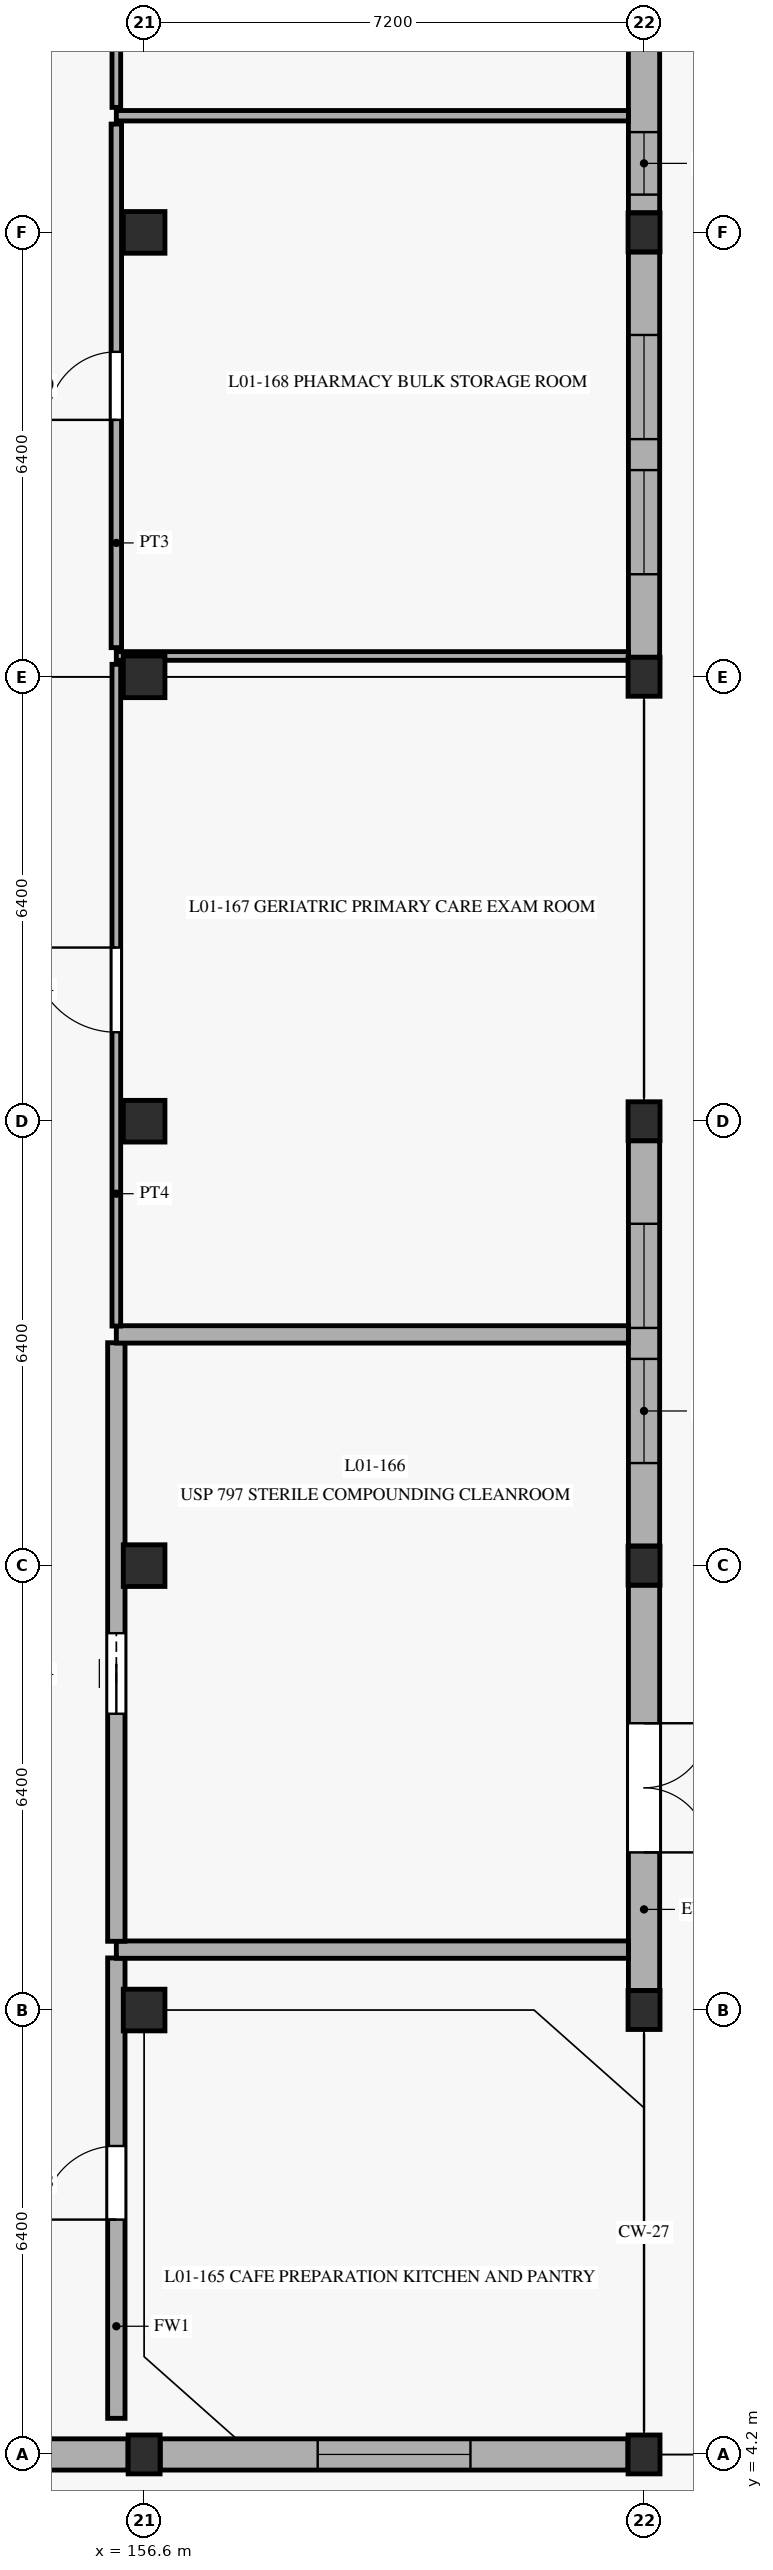
"""IFC4 building model, lengths in metres.
Left out: names, types, materials, properties, quantities, classifications, styles, units other than length and angle.
Written with IfcOpenShell. Run it as: python <this file> out.ifc"""

import sys

from ifc_helpers import new_model, si_unit, direction, frame, frame_2d, origin, origin_with_axes, origin_2d, place, context, subcontext, project, spatial, rectangle, extrude, element, fill, save


model = new_model("IFC4")
c1 = context("Model", 3, precision=1e-05, world=origin(), true_north=direction((0.0, 1.0)))
c2 = subcontext(c1, "Body", "Model", "MODEL_VIEW")
j1 = project(units=[si_unit("LENGTHUNIT", "METRE"), si_unit("PLANEANGLEUNIT", "RADIAN")], contexts=[c1])
p1 = place(None, origin())
s1 = spatial("IfcSite", under=j1, at=p1, CompositionType="ELEMENT")
p2 = place(p1, origin())
s2 = spatial("IfcBuilding", under=s1, at=p2, CompositionType="ELEMENT")
p3 = place(p2, origin())
s3 = spatial("IfcBuildingStorey", under=s2, at=p3, CompositionType="ELEMENT", Elevation=0.0)
p4 = place(p3, frame((156.6, 4.2, 0.0), z_axis=(0.0, 0.0, 1.0), x_axis=(1.0, 0.0, 0.0)))
e1 = element("IfcColumn", 1, at=p4, inside=s3, PredefinedType="COLUMN", context=c2, shape_type="SweptSolid", body=[
    extrude(rectangle(XDim=0.46, YDim=0.56, at=origin_2d()), origin(), (0.0, 0.0, 1.0), 4.8),
])
for number, where, z_axis, x_axis in (
    (2, (156.6, 10.6, 0.0), (0.0, 0.0, 1.0), (1.0, 0.0, 0.0)),
    (3, (156.6, 17.0, 0.0), (0.0, 0.0, 1.0), (1.0, 0.0, 0.0)),
    (4, (156.6, 23.4, 0.0), (0.0, 0.0, 1.0), (1.0, 0.0, 0.0)),
    (5, (156.6, 29.8, 0.0), (0.0, 0.0, 1.0), (1.0, 0.0, 0.0)),
    (6, (156.6, 36.2, 0.0), (0.0, 0.0, 1.0), (1.0, 0.0, 0.0)),
):
    element("IfcColumn", number, at=place(p3, frame(where, z_axis=z_axis, x_axis=x_axis)), inside=s3, PredefinedType="COLUMN", context=c2, shape_type="SweptSolid", body=[
        extrude(rectangle(XDim=0.6, YDim=0.6, at=origin_2d()), origin(), (0.0, 0.0, 1.0), 4.8),
    ])
for number, where, z_axis, x_axis in (
    (7, (163.8, 4.2, 0.0), (0.0, 0.0, 1.0), (1.0, 0.0, 0.0)),
    (8, (163.8, 10.6, 0.0), (0.0, 0.0, 1.0), (1.0, 0.0, 0.0)),
    (9, (163.8, 17.0, 0.0), (0.0, 0.0, 1.0), (1.0, 0.0, 0.0)),
    (10, (163.8, 23.4, 0.0), (0.0, 0.0, 1.0), (1.0, 0.0, 0.0)),
    (11, (163.8, 29.8, 0.0), (0.0, 0.0, 1.0), (1.0, 0.0, 0.0)),
    (12, (163.8, 36.2, 0.0), (0.0, 0.0, 1.0), (1.0, 0.0, 0.0)),
):
    element("IfcColumn", number, at=place(p3, frame(where, z_axis=z_axis, x_axis=x_axis)), inside=s3, PredefinedType="COLUMN", context=c2, shape_type="SweptSolid", body=[
        extrude(rectangle(XDim=0.46, YDim=0.56, at=origin_2d()), origin(), (0.0, 0.0, 1.0), 4.8),
    ])
p5 = place(p3, frame((163.8, 10.882, 0.0), z_axis=(0.0, 0.0, 1.0), x_axis=(0.0, 1.0, 0.0)))
e13 = element("IfcWall", 13, at=p5, inside=s3, PredefinedType="SOLIDWALL", context=c2, shape_type="SweptSolid", body=[
    extrude(rectangle(XDim=5.836, YDim=0.45, at=frame_2d((2.918, 0.0))), origin(), (0.0, 0.0, 1.0), 3.95),
])
p6 = place(p5, frame((1.988, 0.0, 0.0)))
e14 = element("IfcOpeningElement", 14, at=p6, cuts=e13, PredefinedType="OPENING", context=c2, shape_type="SweptSolid", body=[
    extrude(rectangle(XDim=1.86, YDim=2.5, at=frame_2d((0.93, 1.25))), frame((0.0, 0.235, 0.0), z_axis=(0.0, -1.0, 0.0), x_axis=(1.0, 0.0, 0.0)), (0.0, 0.0, 1.0), 0.47),
])
p7 = place(p3, frame((163.8, 17.282, 0.0), z_axis=(0.0, 0.0, 1.0), x_axis=(0.0, 1.0, 0.0)))
e15 = element("IfcWall", 15, at=p7, inside=s3, PredefinedType="SOLIDWALL", context=c2, shape_type="SweptSolid", body=[
    extrude(rectangle(XDim=5.836, YDim=0.45, at=frame_2d((2.918, 0.0))), origin(), (0.0, 0.0, 1.0), 3.95),
])
p8 = place(p7, frame((1.195, 0.0, 0.65)))
e16 = element("IfcOpeningElement", 16, at=p8, cuts=e15, PredefinedType="OPENING", context=c2, shape_type="SweptSolid", body=[
    extrude(rectangle(XDim=1.5, YDim=2.2, at=frame_2d((0.75, 1.1))), frame((0.0, 0.235, 0.0), z_axis=(0.0, -1.0, 0.0), x_axis=(1.0, 0.0, 0.0)), (0.0, 0.0, 1.0), 0.47),
])
p9 = place(p7, frame((3.141, 0.0, 0.65)))
e17 = element("IfcOpeningElement", 17, at=p9, cuts=e15, PredefinedType="OPENING", context=c2, shape_type="SweptSolid", body=[
    extrude(rectangle(XDim=1.5, YDim=2.2, at=frame_2d((0.75, 1.1))), frame((0.0, 0.235, 0.0), z_axis=(0.0, -1.0, 0.0), x_axis=(1.0, 0.0, 0.0)), (0.0, 0.0, 1.0), 0.47),
])
p10 = place(p3, frame((163.8, 30.082, 0.0), z_axis=(0.0, 0.0, 1.0), x_axis=(0.0, 1.0, 0.0)))
e18 = element("IfcWall", 18, at=p10, inside=s3, PredefinedType="SOLIDWALL", context=c2, shape_type="SweptSolid", body=[
    extrude(rectangle(XDim=5.836, YDim=0.45, at=frame_2d((2.918, 0.0))), origin(), (0.0, 0.0, 1.0), 3.95),
])
p11 = place(p10, frame((1.195, 0.0, 0.65)))
e19 = element("IfcOpeningElement", 19, at=p11, cuts=e18, PredefinedType="OPENING", context=c2, shape_type="SweptSolid", body=[
    extrude(rectangle(XDim=1.5, YDim=2.2, at=frame_2d((0.75, 1.1))), frame((0.0, 0.235, 0.0), z_axis=(0.0, -1.0, 0.0), x_axis=(1.0, 0.0, 0.0)), (0.0, 0.0, 1.0), 0.47),
])
p12 = place(p10, frame((3.141, 0.0, 0.65)))
e20 = element("IfcOpeningElement", 20, at=p12, cuts=e18, PredefinedType="OPENING", context=c2, shape_type="SweptSolid", body=[
    extrude(rectangle(XDim=1.5, YDim=2.2, at=frame_2d((0.75, 1.1))), frame((0.0, 0.235, 0.0), z_axis=(0.0, -1.0, 0.0), x_axis=(1.0, 0.0, 0.0)), (0.0, 0.0, 1.0), 0.47),
])
p13 = place(p3, frame((163.8, 36.482, 0.0), z_axis=(0.0, 0.0, 1.0), x_axis=(0.0, 1.0, 0.0)))
e21 = element("IfcWall", 21, at=p13, inside=s3, PredefinedType="SOLIDWALL", context=c2, shape_type="SweptSolid", body=[
    extrude(rectangle(XDim=5.836, YDim=0.45, at=frame_2d((2.918, 0.0))), origin(), (0.0, 0.0, 1.0), 3.95),
])
p14 = place(p13, frame((0.262, 0.0, 0.65)))
e22 = element("IfcOpeningElement", 22, at=p14, cuts=e21, PredefinedType="OPENING", context=c2, shape_type="SweptSolid", body=[
    extrude(rectangle(XDim=0.9, YDim=2.2, at=frame_2d((0.45, 1.1))), frame((0.0, 0.235, 0.0), z_axis=(0.0, -1.0, 0.0), x_axis=(1.0, 0.0, 0.0)), (0.0, 0.0, 1.0), 0.47),
])
p15 = place(p13, frame((2.854, 0.0, 0.65)))
e23 = element("IfcOpeningElement", 23, at=p15, cuts=e21, PredefinedType="OPENING", context=c2, shape_type="SweptSolid", body=[
    extrude(rectangle(XDim=1.5, YDim=2.2, at=frame_2d((0.75, 1.1))), frame((0.0, 0.235, 0.0), z_axis=(0.0, -1.0, 0.0), x_axis=(1.0, 0.0, 0.0)), (0.0, 0.0, 1.0), 0.47),
])
p16 = place(p3, frame((149.032, 4.2, 0.0), z_axis=(0.0, 0.0, 1.0), x_axis=(1.0, 0.0, 0.0)))
e24 = element("IfcWall", 24, at=p16, inside=s3, PredefinedType="SOLIDWALL", context=c2, shape_type="SweptSolid", body=[
    extrude(rectangle(XDim=7.336, YDim=0.45, at=frame_2d((3.668, 0.0))), origin(), (0.0, 0.0, 1.0), 4.0),
])
p17 = place(p16, frame((2.568, 0.0, 0.9)))
e25 = element("IfcOpeningElement", 25, at=p17, cuts=e24, PredefinedType="OPENING", context=c2, shape_type="SweptSolid", body=[
    extrude(rectangle(XDim=2.2, YDim=1.1, at=frame_2d((1.1, 0.55))), frame((0.0, 0.235, 0.0), z_axis=(0.0, -1.0, 0.0), x_axis=(1.0, 0.0, 0.0)), (0.0, 0.0, 1.0), 0.47),
])
p18 = place(p3, frame((156.832, 4.2, 0.0), z_axis=(0.0, 0.0, 1.0), x_axis=(1.0, 0.0, 0.0)))
e26 = element("IfcWall", 26, at=p18, inside=s3, PredefinedType="SOLIDWALL", context=c2, shape_type="SweptSolid", body=[
    extrude(rectangle(XDim=6.736, YDim=0.45, at=frame_2d((3.368, 0.0))), origin(), (0.0, 0.0, 1.0), 4.0),
])
p19 = place(p18, frame((2.268, 0.0, 0.9)))
e27 = element("IfcOpeningElement", 27, at=p19, cuts=e26, PredefinedType="OPENING", context=c2, shape_type="SweptSolid", body=[
    extrude(rectangle(XDim=2.2, YDim=1.1, at=frame_2d((1.1, 0.55))), frame((0.0, 0.235, 0.0), z_axis=(0.0, -1.0, 0.0), x_axis=(1.0, 0.0, 0.0)), (0.0, 0.0, 1.0), 0.47),
])
p20 = place(p3, frame((156.2, 4.72, 0.0), z_axis=(0.0, 0.0, 1.0), x_axis=(0.0, 1.0, 0.0)))
e28 = element("IfcWall", 28, at=p20, inside=s3, PredefinedType="SOLIDWALL", context=c2, shape_type="SweptSolid", body=[
    extrude(rectangle(XDim=6.63, YDim=0.25, at=frame_2d((3.315, 0.0))), origin(), (0.0, 0.0, 1.0), 4.095),
])
p21 = place(p20, frame((2.862, 0.0, 0.0)))
e29 = element("IfcOpeningElement", 29, at=p21, cuts=e28, PredefinedType="OPENING", context=c2, shape_type="SweptSolid", body=[
    extrude(rectangle(XDim=1.06, YDim=2.2, at=frame_2d((0.53, 1.1))), frame((0.0, 0.135, 0.0), z_axis=(0.0, -1.0, 0.0), x_axis=(1.0, 0.0, 0.0)), (0.0, 0.0, 1.0), 0.27),
])
p22 = place(p3, frame((156.2, 11.47, 0.0), z_axis=(0.0, 0.0, 1.0), x_axis=(1.0, 0.0, 0.0)))
e30 = element("IfcWall", 30, at=p22, inside=s3, PredefinedType="SOLIDWALL", context=c2, shape_type="SweptSolid", body=[
    extrude(rectangle(XDim=7.375, YDim=0.25, at=frame_2d((3.688, 0.0))), origin(), (0.0, 0.0, 1.0), 3.945),
])
p23 = place(p3, frame((156.2, 11.59, 0.0), z_axis=(0.0, 0.0, 1.0), x_axis=(0.0, 1.0, 0.0)))
e31 = element("IfcWall", 31, at=p23, inside=s3, PredefinedType="SOLIDWALL", context=c2, shape_type="SweptSolid", body=[
    extrude(rectangle(XDim=8.62, YDim=0.25, at=frame_2d((4.31, 0.0))), origin(), (0.0, 0.0, 1.0), 4.095),
])
p24 = place(p23, frame((3.277, 0.0, 0.0)))
e32 = element("IfcOpeningElement", 32, at=p24, cuts=e31, PredefinedType="OPENING", context=c2, shape_type="SweptSolid", body=[
    extrude(rectangle(XDim=1.16, YDim=2.2, at=frame_2d((0.58, 1.1))), frame((0.0, 0.135, 0.0), z_axis=(0.0, -1.0, 0.0), x_axis=(1.0, 0.0, 0.0)), (0.0, 0.0, 1.0), 0.27),
])
p25 = place(p3, frame((156.2, 20.33, 0.0), z_axis=(0.0, 0.0, 1.0), x_axis=(1.0, 0.0, 0.0)))
e33 = element("IfcWall", 33, at=p25, inside=s3, PredefinedType="SOLIDWALL", context=c2, shape_type="SweptSolid", body=[
    extrude(rectangle(XDim=7.375, YDim=0.25, at=frame_2d((3.688, 0.0))), origin(), (0.0, 0.0, 1.0), 3.945),
])
p26 = place(p3, frame((156.2, 20.45, 0.0), z_axis=(0.0, 0.0, 1.0), x_axis=(0.0, 1.0, 0.0)))
e34 = element("IfcWall", 34, at=p26, inside=s3, PredefinedType="PARTITIONING", context=c2, shape_type="SweptSolid", body=[
    extrude(rectangle(XDim=9.53, YDim=0.125, at=frame_2d((4.765, 0.0))), origin(), (0.0, 0.0, 1.0), 3.845),
])
p27 = place(p26, frame((4.231, 0.0, 0.0)))
e35 = element("IfcOpeningElement", 35, at=p27, cuts=e34, PredefinedType="OPENING", context=c2, shape_type="SweptSolid", body=[
    extrude(rectangle(XDim=1.22, YDim=2.2, at=frame_2d((0.61, 1.1))), frame((0.0, 0.073, 0.0), z_axis=(0.0, -1.0, 0.0), x_axis=(1.0, 0.0, 0.0)), (0.0, 0.0, 1.0), 0.145),
])
p28 = place(p3, frame((156.2, 30.1, 0.0), z_axis=(0.0, 0.0, 1.0), x_axis=(1.0, 0.0, 0.0)))
e36 = element("IfcWall", 36, at=p28, inside=s3, PredefinedType="PARTITIONING", context=c2, shape_type="SweptSolid", body=[
    extrude(rectangle(XDim=7.375, YDim=0.125, at=frame_2d((3.688, 0.0))), origin(), (0.0, 0.0, 1.0), 3.945),
])
p29 = place(p3, frame((156.2, 30.22, 0.0), z_axis=(0.0, 0.0, 1.0), x_axis=(0.0, 1.0, 0.0)))
e37 = element("IfcWall", 37, at=p29, inside=s3, PredefinedType="PARTITIONING", context=c2, shape_type="SweptSolid", body=[
    extrude(rectangle(XDim=7.54, YDim=0.15, at=frame_2d((3.77, 0.0))), origin(), (0.0, 0.0, 1.0), 4.495),
])
p30 = place(p29, frame((3.28, 0.0, 0.0)))
e38 = element("IfcOpeningElement", 38, at=p30, cuts=e37, PredefinedType="OPENING", context=c2, shape_type="SweptSolid", body=[
    extrude(rectangle(XDim=0.98, YDim=2.12, at=frame_2d((0.49, 1.06))), frame((0.0, 0.085, 0.0), z_axis=(0.0, -1.0, 0.0), x_axis=(1.0, 0.0, 0.0)), (0.0, 0.0, 1.0), 0.17),
])
p31 = place(p3, frame((156.2, 37.88, 0.0), z_axis=(0.0, 0.0, 1.0), x_axis=(1.0, 0.0, 0.0)))
e39 = element("IfcWall", 39, at=p31, inside=s3, PredefinedType="PARTITIONING", context=c2, shape_type="SweptSolid", body=[
    extrude(rectangle(XDim=7.375, YDim=0.15, at=frame_2d((3.688, 0.0))), origin(), (0.0, 0.0, 1.0), 3.945),
])
p32 = place(p3, frame((156.2, 38.0, 0.0), z_axis=(0.0, 0.0, 1.0), x_axis=(0.0, 1.0, 0.0)))
e40 = element("IfcWall", 40, at=p32, inside=s3, PredefinedType="PARTITIONING", context=c2, shape_type="SweptSolid", body=[
    extrude(rectangle(XDim=9.03, YDim=0.125, at=frame_2d((4.515, 0.0))), origin(), (0.0, 0.0, 1.0), 4.495),
])
p33 = place(p32, frame((2.847, 0.0, 0.0)))
e41 = element("IfcOpeningElement", 41, at=p33, cuts=e40, PredefinedType="OPENING", context=c2, shape_type="SweptSolid", body=[
    extrude(rectangle(XDim=0.9, YDim=2.12, at=frame_2d((0.45, 1.06))), frame((0.0, 0.073, 0.0), z_axis=(0.0, -1.0, 0.0), x_axis=(1.0, 0.0, 0.0)), (0.0, 0.0, 1.0), 0.145),
])
p34 = place(p6, frame((1.86, 0.0, 0.0), z_axis=(0.0, 0.0, 1.0), x_axis=(-1.0, 0.0, 0.0)))
e42 = element("IfcDoor", 42, at=p34, inside=s3, OperationType="DOUBLE_DOOR_SINGLE_SWING", PredefinedType="DOOR", context=c2, shape_type="SweptSolid", body=[
    extrude(rectangle(XDim=1.86, YDim=2.5, at=frame_2d((0.93, 1.25))), frame((0.0, 0.025, 0.0), z_axis=(0.0, -1.0, 0.0), x_axis=(1.0, 0.0, 0.0)), (0.0, 0.0, 1.0), 0.05),
])
fill(e14, e42)
p35 = place(p8, origin_with_axes())
e43 = element("IfcWindow", 43, at=p35, inside=s3, PartitioningType="SINGLE_PANEL", PredefinedType="WINDOW", context=c2, shape_type="SweptSolid", body=[
    extrude(rectangle(XDim=1.5, YDim=2.2, at=frame_2d((0.75, 1.1))), frame((0.0, 0.03, 0.0), z_axis=(0.0, -1.0, 0.0), x_axis=(1.0, 0.0, 0.0)), (0.0, 0.0, 1.0), 0.06),
])
fill(e16, e43)
p36 = place(p9, origin_with_axes())
e44 = element("IfcWindow", 44, at=p36, inside=s3, PartitioningType="SINGLE_PANEL", PredefinedType="WINDOW", context=c2, shape_type="SweptSolid", body=[
    extrude(rectangle(XDim=1.5, YDim=2.2, at=frame_2d((0.75, 1.1))), frame((0.0, 0.03, 0.0), z_axis=(0.0, -1.0, 0.0), x_axis=(1.0, 0.0, 0.0)), (0.0, 0.0, 1.0), 0.06),
])
fill(e17, e44)
p37 = place(p11, origin_with_axes())
e45 = element("IfcWindow", 45, at=p37, inside=s3, PartitioningType="SINGLE_PANEL", PredefinedType="WINDOW", context=c2, shape_type="SweptSolid", body=[
    extrude(rectangle(XDim=1.5, YDim=2.2, at=frame_2d((0.75, 1.1))), frame((0.0, 0.03, 0.0), z_axis=(0.0, -1.0, 0.0), x_axis=(1.0, 0.0, 0.0)), (0.0, 0.0, 1.0), 0.06),
])
fill(e19, e45)
p38 = place(p12, origin_with_axes())
e46 = element("IfcWindow", 46, at=p38, inside=s3, PartitioningType="SINGLE_PANEL", PredefinedType="WINDOW", context=c2, shape_type="SweptSolid", body=[
    extrude(rectangle(XDim=1.5, YDim=2.2, at=frame_2d((0.75, 1.1))), frame((0.0, 0.03, 0.0), z_axis=(0.0, -1.0, 0.0), x_axis=(1.0, 0.0, 0.0)), (0.0, 0.0, 1.0), 0.06),
])
fill(e20, e46)
p39 = place(p14, origin_with_axes())
e47 = element("IfcWindow", 47, at=p39, inside=s3, PartitioningType="SINGLE_PANEL", PredefinedType="WINDOW", context=c2, shape_type="SweptSolid", body=[
    extrude(rectangle(XDim=0.9, YDim=2.2, at=frame_2d((0.45, 1.1))), frame((0.0, 0.03, 0.0), z_axis=(0.0, -1.0, 0.0), x_axis=(1.0, 0.0, 0.0)), (0.0, 0.0, 1.0), 0.06),
])
fill(e22, e47)
p40 = place(p19, origin_with_axes())
e48 = element("IfcWindow", 48, at=p40, inside=s3, PartitioningType="SINGLE_PANEL", PredefinedType="WINDOW", context=c2, shape_type="SweptSolid", body=[
    extrude(rectangle(XDim=2.2, YDim=1.1, at=frame_2d((1.1, 0.55))), frame((0.0, 0.03, 0.0), z_axis=(0.0, -1.0, 0.0), x_axis=(1.0, 0.0, 0.0)), (0.0, 0.0, 1.0), 0.06),
])
fill(e27, e48)
p41 = place(p21, frame((1.06, 0.0, 0.0), z_axis=(0.0, 0.0, 1.0), x_axis=(-1.0, 0.0, 0.0)))
e49 = element("IfcDoor", 49, at=p41, inside=s3, OperationType="SINGLE_SWING_RIGHT", PredefinedType="DOOR", context=c2, shape_type="SweptSolid", body=[
    extrude(rectangle(XDim=1.06, YDim=2.2, at=frame_2d((0.53, 1.1))), frame((0.0, 0.025, 0.0), z_axis=(0.0, -1.0, 0.0), x_axis=(1.0, 0.0, 0.0)), (0.0, 0.0, 1.0), 0.05),
])
fill(e29, e49)
p42 = place(p24, frame((1.16, 0.0, 0.0), z_axis=(0.0, 0.0, 1.0), x_axis=(-1.0, 0.0, 0.0)))
e50 = element("IfcDoor", 50, at=p42, inside=s3, OperationType="SLIDING_TO_LEFT", PredefinedType="DOOR", context=c2, shape_type="SweptSolid", body=[
    extrude(rectangle(XDim=1.16, YDim=2.2, at=frame_2d((0.58, 1.1))), frame((0.0, 0.025, 0.0), z_axis=(0.0, -1.0, 0.0), x_axis=(1.0, 0.0, 0.0)), (0.0, 0.0, 1.0), 0.05),
])
fill(e32, e50)
p43 = place(p27, frame((1.22, 0.0, 0.0), z_axis=(0.0, 0.0, 1.0), x_axis=(-1.0, 0.0, 0.0)))
e51 = element("IfcDoor", 51, at=p43, inside=s3, OperationType="SINGLE_SWING_LEFT", PredefinedType="DOOR", context=c2, shape_type="SweptSolid", body=[
    extrude(rectangle(XDim=1.22, YDim=2.2, at=frame_2d((0.61, 1.1))), frame((0.0, 0.025, 0.0), z_axis=(0.0, -1.0, 0.0), x_axis=(1.0, 0.0, 0.0)), (0.0, 0.0, 1.0), 0.05),
])
fill(e35, e51)
p44 = place(p30, frame((0.98, 0.0, 0.0), z_axis=(0.0, 0.0, 1.0), x_axis=(-1.0, 0.0, 0.0)))
e52 = element("IfcDoor", 52, at=p44, inside=s3, OperationType="SINGLE_SWING_RIGHT", PredefinedType="DOOR", context=c2, shape_type="SweptSolid", body=[
    extrude(rectangle(XDim=0.98, YDim=2.12, at=frame_2d((0.49, 1.06))), frame((0.0, 0.025, 0.0), z_axis=(0.0, -1.0, 0.0), x_axis=(1.0, 0.0, 0.0)), (0.0, 0.0, 1.0), 0.05),
])
fill(e38, e52)
save(model, sys.argv[1])
